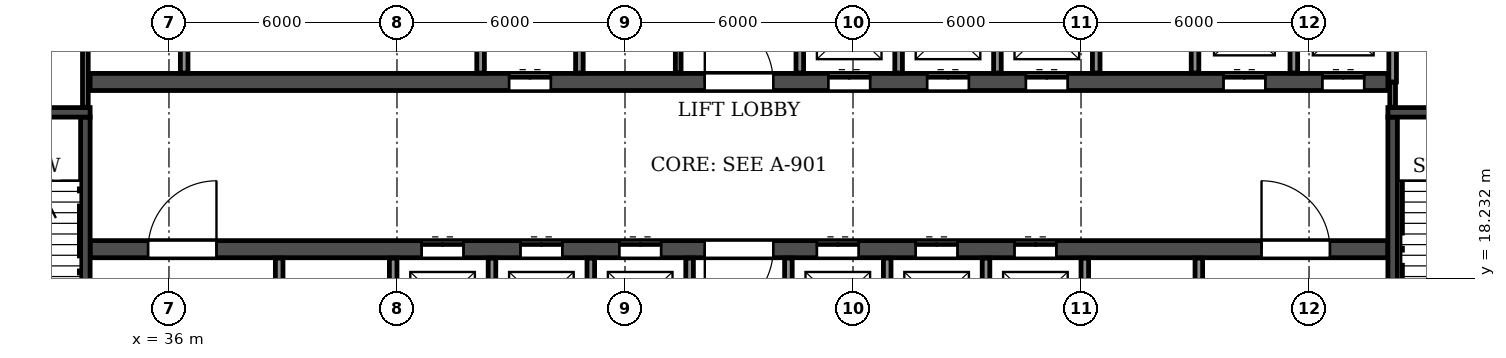
"""IFC4 building model, lengths in metres.
Left out: names, types, materials, properties, quantities, classifications, styles, units other than length and angle.
Written with IfcOpenShell. Run it as: python <this file> out.ifc"""

import sys

from ifc_helpers import new_model, si_unit, direction, frame, frame_2d, origin, place, context, subcontext, project, spatial, rectangle, extrude, element, fill, save


model = new_model("IFC4")
c1 = context("Model", 3, precision=1e-05, world=origin(), true_north=direction((0.0, 1.0)))
c2 = subcontext(c1, "Body", "Model", "MODEL_VIEW")
j1 = project(units=[si_unit("LENGTHUNIT", "METRE"), si_unit("PLANEANGLEUNIT", "RADIAN")], contexts=[c1])
p1 = place(None, origin())
s1 = spatial("IfcSite", under=j1, at=p1, CompositionType="ELEMENT")
p2 = place(p1, origin())
s2 = spatial("IfcBuilding", under=s1, at=p2, CompositionType="ELEMENT")
p3 = place(p2, origin())
s3 = spatial("IfcBuildingStorey", under=s2, at=p3, CompositionType="ELEMENT", Elevation=0.0)
p4 = place(p3, frame((33.925, 19.0, 0.0), z_axis=(0.0, 0.0, 1.0), x_axis=(1.0, 0.0, 0.0)))
e1 = element("IfcWall", 1, at=p4, inside=s3, PredefinedType="SOLIDWALL", context=c2, shape_type="SweptSolid", body=[
    extrude(rectangle(XDim=34.15, YDim=0.45, at=frame_2d((17.075, 0.0))), origin(), (0.0, 0.0, 1.0), 4.2),
])
p5 = place(p4, frame((16.175, 0.0, 0.0)))
e2 = element("IfcOpeningElement", 2, at=p5, cuts=e1, PredefinedType="OPENING", context=c2, shape_type="SweptSolid", body=[
    extrude(rectangle(XDim=1.8, YDim=2.1, at=frame_2d((0.9, 1.05))), frame((0.0, 0.235, 0.0), z_axis=(0.0, -1.0, 0.0), x_axis=(1.0, 0.0, 0.0)), (0.0, 0.0, 1.0), 0.47),
])
p6 = place(p4, frame((1.525, 0.0, 0.0)))
e3 = element("IfcOpeningElement", 3, at=p6, cuts=e1, PredefinedType="OPENING", context=c2, shape_type="SweptSolid", body=[
    extrude(rectangle(XDim=1.8, YDim=2.1, at=frame_2d((0.9, 1.05))), frame((0.0, 0.235, 0.0), z_axis=(0.0, -1.0, 0.0), x_axis=(1.0, 0.0, 0.0)), (0.0, 0.0, 1.0), 0.47),
])
p7 = place(p4, frame((8.725, 0.0, 0.0)))
e4 = element("IfcOpeningElement", 4, at=p7, cuts=e1, PredefinedType="OPENING", context=c2, shape_type="SweptSolid", body=[
    extrude(rectangle(XDim=1.1, YDim=2.1, at=frame_2d((0.55, 1.05))), frame((0.0, 0.235, 0.0), z_axis=(0.0, -1.0, 0.0), x_axis=(1.0, 0.0, 0.0)), (0.0, 0.0, 1.0), 0.47),
])
p8 = place(p4, frame((11.325, 0.0, 0.0)))
e5 = element("IfcOpeningElement", 5, at=p8, cuts=e1, PredefinedType="OPENING", context=c2, shape_type="SweptSolid", body=[
    extrude(rectangle(XDim=1.1, YDim=2.1, at=frame_2d((0.55, 1.05))), frame((0.0, 0.235, 0.0), z_axis=(0.0, -1.0, 0.0), x_axis=(1.0, 0.0, 0.0)), (0.0, 0.0, 1.0), 0.47),
])
p9 = place(p4, frame((13.925, 0.0, 0.0)))
e6 = element("IfcOpeningElement", 6, at=p9, cuts=e1, PredefinedType="OPENING", context=c2, shape_type="SweptSolid", body=[
    extrude(rectangle(XDim=1.1, YDim=2.1, at=frame_2d((0.55, 1.05))), frame((0.0, 0.235, 0.0), z_axis=(0.0, -1.0, 0.0), x_axis=(1.0, 0.0, 0.0)), (0.0, 0.0, 1.0), 0.47),
])
p10 = place(p4, frame((19.125, 0.0, 0.0)))
e7 = element("IfcOpeningElement", 7, at=p10, cuts=e1, PredefinedType="OPENING", context=c2, shape_type="SweptSolid", body=[
    extrude(rectangle(XDim=1.1, YDim=2.1, at=frame_2d((0.55, 1.05))), frame((0.0, 0.235, 0.0), z_axis=(0.0, -1.0, 0.0), x_axis=(1.0, 0.0, 0.0)), (0.0, 0.0, 1.0), 0.47),
])
p11 = place(p4, frame((21.725, 0.0, 0.0)))
e8 = element("IfcOpeningElement", 8, at=p11, cuts=e1, PredefinedType="OPENING", context=c2, shape_type="SweptSolid", body=[
    extrude(rectangle(XDim=1.1, YDim=2.1, at=frame_2d((0.55, 1.05))), frame((0.0, 0.235, 0.0), z_axis=(0.0, -1.0, 0.0), x_axis=(1.0, 0.0, 0.0)), (0.0, 0.0, 1.0), 0.47),
])
p12 = place(p4, frame((24.325, 0.0, 0.0)))
e9 = element("IfcOpeningElement", 9, at=p12, cuts=e1, PredefinedType="OPENING", context=c2, shape_type="SweptSolid", body=[
    extrude(rectangle(XDim=1.1, YDim=2.1, at=frame_2d((0.55, 1.05))), frame((0.0, 0.235, 0.0), z_axis=(0.0, -1.0, 0.0), x_axis=(1.0, 0.0, 0.0)), (0.0, 0.0, 1.0), 0.47),
])
p13 = place(p4, frame((30.825, 0.0, 0.0)))
e10 = element("IfcOpeningElement", 10, at=p13, cuts=e1, PredefinedType="OPENING", context=c2, shape_type="SweptSolid", body=[
    extrude(rectangle(XDim=1.8, YDim=2.1, at=frame_2d((0.9, 1.05))), frame((0.0, 0.235, 0.0), z_axis=(0.0, -1.0, 0.0), x_axis=(1.0, 0.0, 0.0)), (0.0, 0.0, 1.0), 0.47),
])
p14 = place(p3, frame((33.925, 23.4, 0.0), z_axis=(0.0, 0.0, 1.0), x_axis=(1.0, 0.0, 0.0)))
e11 = element("IfcWall", 11, at=p14, inside=s3, PredefinedType="SOLIDWALL", context=c2, shape_type="SweptSolid", body=[
    extrude(rectangle(XDim=34.15, YDim=0.45, at=frame_2d((17.075, 0.0))), origin(), (0.0, 0.0, 1.0), 4.2),
])
p15 = place(p14, frame((16.175, 0.0, 0.0)))
e12 = element("IfcOpeningElement", 12, at=p15, cuts=e11, PredefinedType="OPENING", context=c2, shape_type="SweptSolid", body=[
    extrude(rectangle(XDim=1.8, YDim=2.1, at=frame_2d((0.9, 1.05))), frame((0.0, 0.235, 0.0), z_axis=(0.0, -1.0, 0.0), x_axis=(1.0, 0.0, 0.0)), (0.0, 0.0, 1.0), 0.47),
])
p16 = place(p14, frame((11.025, 0.0, 0.0)))
e13 = element("IfcOpeningElement", 13, at=p16, cuts=e11, PredefinedType="OPENING", context=c2, shape_type="SweptSolid", body=[
    extrude(rectangle(XDim=1.1, YDim=2.1, at=frame_2d((0.55, 1.05))), frame((0.0, 0.235, 0.0), z_axis=(0.0, -1.0, 0.0), x_axis=(1.0, 0.0, 0.0)), (0.0, 0.0, 1.0), 0.47),
])
p17 = place(p14, frame((19.425, 0.0, 0.0)))
e14 = element("IfcOpeningElement", 14, at=p17, cuts=e11, PredefinedType="OPENING", context=c2, shape_type="SweptSolid", body=[
    extrude(rectangle(XDim=1.1, YDim=2.1, at=frame_2d((0.55, 1.05))), frame((0.0, 0.235, 0.0), z_axis=(0.0, -1.0, 0.0), x_axis=(1.0, 0.0, 0.0)), (0.0, 0.0, 1.0), 0.47),
])
p18 = place(p14, frame((22.025, 0.0, 0.0)))
e15 = element("IfcOpeningElement", 15, at=p18, cuts=e11, PredefinedType="OPENING", context=c2, shape_type="SweptSolid", body=[
    extrude(rectangle(XDim=1.1, YDim=2.1, at=frame_2d((0.55, 1.05))), frame((0.0, 0.235, 0.0), z_axis=(0.0, -1.0, 0.0), x_axis=(1.0, 0.0, 0.0)), (0.0, 0.0, 1.0), 0.47),
])
p19 = place(p14, frame((24.625, 0.0, 0.0)))
e16 = element("IfcOpeningElement", 16, at=p19, cuts=e11, PredefinedType="OPENING", context=c2, shape_type="SweptSolid", body=[
    extrude(rectangle(XDim=1.1, YDim=2.1, at=frame_2d((0.55, 1.05))), frame((0.0, 0.235, 0.0), z_axis=(0.0, -1.0, 0.0), x_axis=(1.0, 0.0, 0.0)), (0.0, 0.0, 1.0), 0.47),
])
p20 = place(p14, frame((29.825, 0.0, 0.0)))
e17 = element("IfcOpeningElement", 17, at=p20, cuts=e11, PredefinedType="OPENING", context=c2, shape_type="SweptSolid", body=[
    extrude(rectangle(XDim=1.1, YDim=2.1, at=frame_2d((0.55, 1.05))), frame((0.0, 0.235, 0.0), z_axis=(0.0, -1.0, 0.0), x_axis=(1.0, 0.0, 0.0)), (0.0, 0.0, 1.0), 0.47),
])
p21 = place(p14, frame((32.425, 0.0, 0.0)))
e18 = element("IfcOpeningElement", 18, at=p21, cuts=e11, PredefinedType="OPENING", context=c2, shape_type="SweptSolid", body=[
    extrude(rectangle(XDim=1.1, YDim=2.1, at=frame_2d((0.55, 1.05))), frame((0.0, 0.235, 0.0), z_axis=(0.0, -1.0, 0.0), x_axis=(1.0, 0.0, 0.0)), (0.0, 0.0, 1.0), 0.47),
])
p22 = place(p3, frame((33.8, 14.6, 0.0), z_axis=(0.0, 0.0, 1.0), x_axis=(0.0, 1.0, 0.0)))
e19 = element("IfcWall", 19, at=p22, inside=s3, PredefinedType="SOLIDWALL", context=c2, shape_type="SweptSolid", body=[
    extrude(rectangle(XDim=7.875, YDim=0.25, at=frame_2d((3.938, 0.0))), origin(), (0.0, 0.0, 1.0), 4.2),
])
p23 = place(p22, frame((0.7, 0.0, 0.0)))
e20 = element("IfcOpeningElement", 20, at=p23, cuts=e19, PredefinedType="OPENING", context=c2, shape_type="SweptSolid", body=[
    extrude(rectangle(XDim=1.0, YDim=2.1, at=frame_2d((0.5, 1.05))), frame((0.0, 0.135, 0.0), z_axis=(0.0, -1.0, 0.0), x_axis=(1.0, 0.0, 0.0)), (0.0, 0.0, 1.0), 0.27),
])
p24 = place(p3, frame((29.875, 22.6, 0.0), z_axis=(0.0, 0.0, 1.0), x_axis=(1.0, 0.0, 0.0)))
e21 = element("IfcWall", 21, at=p24, inside=s3, PredefinedType="SOLIDWALL", context=c2, shape_type="SweptSolid", body=[
    extrude(rectangle(XDim=4.05, YDim=0.25, at=frame_2d((2.025, 0.0))), origin(), (0.0, 0.0, 1.0), 4.2),
])
p25 = place(p3, frame((68.2, 14.6, 0.0), z_axis=(0.0, 0.0, 1.0), x_axis=(0.0, 1.0, 0.0)))
e22 = element("IfcWall", 22, at=p25, inside=s3, PredefinedType="SOLIDWALL", context=c2, shape_type="SweptSolid", body=[
    extrude(rectangle(XDim=7.875, YDim=0.25, at=frame_2d((3.938, 0.0))), origin(), (0.0, 0.0, 1.0), 4.2),
])
p26 = place(p25, frame((0.7, 0.0, 0.0)))
e23 = element("IfcOpeningElement", 23, at=p26, cuts=e22, PredefinedType="OPENING", context=c2, shape_type="SweptSolid", body=[
    extrude(rectangle(XDim=1.0, YDim=2.1, at=frame_2d((0.5, 1.05))), frame((0.0, 0.135, 0.0), z_axis=(0.0, -1.0, 0.0), x_axis=(1.0, 0.0, 0.0)), (0.0, 0.0, 1.0), 0.27),
])
p27 = place(p3, frame((68.075, 22.6, 0.0), z_axis=(0.0, 0.0, 1.0), x_axis=(1.0, 0.0, 0.0)))
e24 = element("IfcWall", 24, at=p27, inside=s3, PredefinedType="SOLIDWALL", context=c2, shape_type="SweptSolid", body=[
    extrude(rectangle(XDim=4.05, YDim=0.25, at=frame_2d((2.025, 0.0))), origin(), (0.0, 0.0, 1.0), 4.2),
])
p28 = place(p3, frame((49.4, 23.635, 0.0), z_axis=(0.0, 0.0, 1.0), x_axis=(0.0, 1.0, 0.0)))
e25 = element("IfcWall", 25, at=p28, inside=s3, PredefinedType="PARTITIONING", context=c2, shape_type="SweptSolid", body=[
    extrude(rectangle(XDim=4.09, YDim=0.15, at=frame_2d((2.045, 0.0))), origin(), (0.0, 0.0, 1.0), 4.2),
])
p29 = place(p3, frame((36.4, 23.635, 0.0), z_axis=(0.0, 0.0, 1.0), x_axis=(0.0, 1.0, 0.0)))
e26 = element("IfcWall", 26, at=p29, inside=s3, PredefinedType="PARTITIONING", context=c2, shape_type="SweptSolid", body=[
    extrude(rectangle(XDim=4.09, YDim=0.2, at=frame_2d((2.045, 0.0))), origin(), (0.0, 0.0, 1.0), 4.2),
])
p30 = place(p3, frame((33.8, 22.735, 0.0), z_axis=(0.0, 0.0, 1.0), x_axis=(0.0, 1.0, 0.0)))
e27 = element("IfcWall", 27, at=p30, inside=s3, PredefinedType="PARTITIONING", context=c2, shape_type="SweptSolid", body=[
    extrude(rectangle(XDim=4.99, YDim=0.15, at=frame_2d((2.495, 0.0))), origin(), (0.0, 0.0, 1.0), 4.2),
])
p31 = place(p3, frame((68.2, 22.735, 0.0), z_axis=(0.0, 0.0, 1.0), x_axis=(0.0, 1.0, 0.0)))
e28 = element("IfcWall", 28, at=p31, inside=s3, PredefinedType="PARTITIONING", context=c2, shape_type="SweptSolid", body=[
    extrude(rectangle(XDim=0.665, YDim=0.15, at=frame_2d((0.333, 0.0))), origin(), (0.0, 0.0, 1.0), 4.2),
])
p32 = place(p3, frame((38.9, 14.7, 0.0), z_axis=(0.0, 0.0, 1.0), x_axis=(0.0, 1.0, 0.0)))
e29 = element("IfcWall", 29, at=p32, inside=s3, PredefinedType="PARTITIONING", context=c2, shape_type="SweptSolid", body=[
    extrude(rectangle(XDim=4.065, YDim=0.2, at=frame_2d((2.032, 0.0))), origin(), (0.0, 0.0, 1.0), 4.2),
])
p33 = place(p32, frame((1.55, 0.0, 0.0)))
e30 = element("IfcOpeningElement", 30, at=p33, cuts=e29, PredefinedType="OPENING", context=c2, shape_type="SweptSolid", body=[
    extrude(rectangle(XDim=1.1, YDim=2.1, at=frame_2d((0.55, 1.05))), frame((0.0, 0.11, 0.0), z_axis=(0.0, -1.0, 0.0), x_axis=(1.0, 0.0, 0.0)), (0.0, 0.0, 1.0), 0.22),
])
for number, where, z_axis, x_axis in (
    (31, (41.9, 14.7, 0.0), (0.0, 0.0, 1.0), (0.0, 1.0, 0.0)),
    (32, (44.2, 23.635, 0.0), (0.0, 0.0, 1.0), (0.0, 1.0, 0.0)),
):
    element("IfcWall", number, at=place(p3, frame(where, z_axis=z_axis, x_axis=x_axis)), inside=s3, PredefinedType="PARTITIONING", context=c2, shape_type="SweptSolid", body=[
        extrude(rectangle(XDim=4.065, YDim=0.2, at=frame_2d((2.032, 0.0))), origin(), (0.0, 0.0, 1.0), 4.2),
    ])
p34 = place(p3, frame((44.5, 16.3, 0.0), z_axis=(0.0, 0.0, 1.0), x_axis=(0.0, 1.0, 0.0)))
e33 = element("IfcWall", 33, at=p34, inside=s3, PredefinedType="PARTITIONING", context=c2, shape_type="SweptSolid", body=[
    extrude(rectangle(XDim=2.465, YDim=0.2, at=frame_2d((1.232, 0.0))), origin(), (0.0, 0.0, 1.0), 4.2),
])
p35 = place(p3, frame((46.8, 23.635, 0.0), z_axis=(0.0, 0.0, 1.0), x_axis=(0.0, 1.0, 0.0)))
e34 = element("IfcWall", 34, at=p35, inside=s3, PredefinedType="PARTITIONING", context=c2, shape_type="SweptSolid", body=[
    extrude(rectangle(XDim=4.065, YDim=0.2, at=frame_2d((2.032, 0.0))), origin(), (0.0, 0.0, 1.0), 4.2),
])
for number, where, z_axis, x_axis in (
    (35, (47.1, 16.3, 0.0), (0.0, 0.0, 1.0), (0.0, 1.0, 0.0)),
    (36, (49.7, 16.3, 0.0), (0.0, 0.0, 1.0), (0.0, 1.0, 0.0)),
    (37, (52.3, 16.3, 0.0), (0.0, 0.0, 1.0), (0.0, 1.0, 0.0)),
):
    element("IfcWall", number, at=place(p3, frame(where, z_axis=z_axis, x_axis=x_axis)), inside=s3, PredefinedType="PARTITIONING", context=c2, shape_type="SweptSolid", body=[
        extrude(rectangle(XDim=2.465, YDim=0.2, at=frame_2d((1.232, 0.0))), origin(), (0.0, 0.0, 1.0), 4.2),
    ])
p36 = place(p3, frame((52.6, 23.635, 0.0), z_axis=(0.0, 0.0, 1.0), x_axis=(0.0, 1.0, 0.0)))
e38 = element("IfcWall", 38, at=p36, inside=s3, PredefinedType="PARTITIONING", context=c2, shape_type="SweptSolid", body=[
    extrude(rectangle(XDim=2.465, YDim=0.2, at=frame_2d((1.232, 0.0))), origin(), (0.0, 0.0, 1.0), 4.2),
])
p37 = place(p3, frame((54.9, 16.3, 0.0), z_axis=(0.0, 0.0, 1.0), x_axis=(0.0, 1.0, 0.0)))
e39 = element("IfcWall", 39, at=p37, inside=s3, PredefinedType="PARTITIONING", context=c2, shape_type="SweptSolid", body=[
    extrude(rectangle(XDim=2.465, YDim=0.2, at=frame_2d((1.232, 0.0))), origin(), (0.0, 0.0, 1.0), 4.2),
])
p38 = place(p3, frame((55.2, 23.635, 0.0), z_axis=(0.0, 0.0, 1.0), x_axis=(0.0, 1.0, 0.0)))
e40 = element("IfcWall", 40, at=p38, inside=s3, PredefinedType="PARTITIONING", context=c2, shape_type="SweptSolid", body=[
    extrude(rectangle(XDim=2.465, YDim=0.2, at=frame_2d((1.232, 0.0))), origin(), (0.0, 0.0, 1.0), 4.2),
])
p39 = place(p3, frame((57.5, 16.3, 0.0), z_axis=(0.0, 0.0, 1.0), x_axis=(0.0, 1.0, 0.0)))
e41 = element("IfcWall", 41, at=p39, inside=s3, PredefinedType="PARTITIONING", context=c2, shape_type="SweptSolid", body=[
    extrude(rectangle(XDim=2.465, YDim=0.2, at=frame_2d((1.232, 0.0))), origin(), (0.0, 0.0, 1.0), 4.2),
])
p40 = place(p3, frame((57.8, 23.635, 0.0), z_axis=(0.0, 0.0, 1.0), x_axis=(0.0, 1.0, 0.0)))
e42 = element("IfcWall", 42, at=p40, inside=s3, PredefinedType="PARTITIONING", context=c2, shape_type="SweptSolid", body=[
    extrude(rectangle(XDim=2.465, YDim=0.2, at=frame_2d((1.232, 0.0))), origin(), (0.0, 0.0, 1.0), 4.2),
])
p41 = place(p3, frame((60.1, 14.7, 0.0), z_axis=(0.0, 0.0, 1.0), x_axis=(0.0, 1.0, 0.0)))
e43 = element("IfcWall", 43, at=p41, inside=s3, PredefinedType="PARTITIONING", context=c2, shape_type="SweptSolid", body=[
    extrude(rectangle(XDim=4.065, YDim=0.2, at=frame_2d((2.032, 0.0))), origin(), (0.0, 0.0, 1.0), 4.2),
])
for number, where, z_axis, x_axis in (
    (44, (60.4, 23.635, 0.0), (0.0, 0.0, 1.0), (0.0, 1.0, 0.0)),
    (45, (63.0, 23.635, 0.0), (0.0, 0.0, 1.0), (0.0, 1.0, 0.0)),
):
    element("IfcWall", number, at=place(p3, frame(where, z_axis=z_axis, x_axis=x_axis)), inside=s3, PredefinedType="PARTITIONING", context=c2, shape_type="SweptSolid", body=[
        extrude(rectangle(XDim=2.465, YDim=0.2, at=frame_2d((1.232, 0.0))), origin(), (0.0, 0.0, 1.0), 4.2),
    ])
p42 = place(p3, frame((63.1, 14.7, 0.0), z_axis=(0.0, 0.0, 1.0), x_axis=(0.0, 1.0, 0.0)))
e46 = element("IfcWall", 46, at=p42, inside=s3, PredefinedType="PARTITIONING", context=c2, shape_type="SweptSolid", body=[
    extrude(rectangle(XDim=4.065, YDim=0.2, at=frame_2d((2.032, 0.0))), origin(), (0.0, 0.0, 1.0), 4.2),
])
p43 = place(p42, frame((1.55, 0.0, 0.0)))
e47 = element("IfcOpeningElement", 47, at=p43, cuts=e46, PredefinedType="OPENING", context=c2, shape_type="SweptSolid", body=[
    extrude(rectangle(XDim=1.1, YDim=2.1, at=frame_2d((0.55, 1.05))), frame((0.0, 0.11, 0.0), z_axis=(0.0, -1.0, 0.0), x_axis=(1.0, 0.0, 0.0)), (0.0, 0.0, 1.0), 0.22),
])
p44 = place(p3, frame((65.6, 23.635, 0.0), z_axis=(0.0, 0.0, 1.0), x_axis=(0.0, 1.0, 0.0)))
e48 = element("IfcWall", 48, at=p44, inside=s3, PredefinedType="PARTITIONING", context=c2, shape_type="SweptSolid", body=[
    extrude(rectangle(XDim=2.465, YDim=0.2, at=frame_2d((1.232, 0.0))), origin(), (0.0, 0.0, 1.0), 4.2),
])
p45 = place(p3, frame((68.2, 23.4, 0.0), z_axis=(0.0, 0.0, 1.0), x_axis=(0.0, 1.0, 0.0)))
e49 = element("IfcWall", 49, at=p45, inside=s3, PredefinedType="PARTITIONING", context=c2, shape_type="SweptSolid", body=[
    extrude(rectangle(XDim=2.7, YDim=0.2, at=frame_2d((1.35, 0.0))), origin(), (0.0, 0.0, 1.0), 4.2),
])
p46 = place(p15, origin())
e50 = element("IfcDoor", 50, at=p46, inside=s3, OperationType="DOUBLE_DOOR_SINGLE_SWING", PredefinedType="DOOR", context=c2, shape_type="SweptSolid", body=[
    extrude(rectangle(XDim=1.8, YDim=2.1, at=frame_2d((0.9, 1.05))), frame((0.0, 0.025, 0.0), z_axis=(0.0, -1.0, 0.0), x_axis=(1.0, 0.0, 0.0)), (0.0, 0.0, 1.0), 0.05),
])
fill(e12, e50)
p47 = place(p5, frame((1.8, 0.0, 0.0), z_axis=(0.0, 0.0, 1.0), x_axis=(-1.0, 0.0, 0.0)))
e51 = element("IfcDoor", 51, at=p47, inside=s3, OperationType="DOUBLE_DOOR_SINGLE_SWING", PredefinedType="DOOR", context=c2, shape_type="SweptSolid", body=[
    extrude(rectangle(XDim=1.8, YDim=2.1, at=frame_2d((0.9, 1.05))), frame((0.0, 0.025, 0.0), z_axis=(0.0, -1.0, 0.0), x_axis=(1.0, 0.0, 0.0)), (0.0, 0.0, 1.0), 0.05),
])
fill(e2, e51)
p48 = place(p6, origin())
e52 = element("IfcDoor", 52, at=p48, inside=s3, OperationType="DOUBLE_DOOR_SINGLE_SWING", PredefinedType="DOOR", context=c2, shape_type="SweptSolid", body=[
    extrude(rectangle(XDim=1.8, YDim=2.1, at=frame_2d((0.9, 1.05))), frame((0.0, 0.025, 0.0), z_axis=(0.0, -1.0, 0.0), x_axis=(1.0, 0.0, 0.0)), (0.0, 0.0, 1.0), 0.05),
])
fill(e3, e52)
p49 = place(p7, origin())
e53 = element("IfcDoor", 53, at=p49, inside=s3, OperationType="DOUBLE_DOOR_SLIDING", PredefinedType="DOOR", context=c2, shape_type="SweptSolid", body=[
    extrude(rectangle(XDim=1.1, YDim=2.1, at=frame_2d((0.55, 1.05))), frame((0.0, 0.025, 0.0), z_axis=(0.0, -1.0, 0.0), x_axis=(1.0, 0.0, 0.0)), (0.0, 0.0, 1.0), 0.05),
])
fill(e4, e53)
p50 = place(p16, origin())
e54 = element("IfcDoor", 54, at=p50, inside=s3, OperationType="DOUBLE_DOOR_SLIDING", PredefinedType="DOOR", context=c2, shape_type="SweptSolid", body=[
    extrude(rectangle(XDim=1.1, YDim=2.1, at=frame_2d((0.55, 1.05))), frame((0.0, 0.025, 0.0), z_axis=(0.0, -1.0, 0.0), x_axis=(1.0, 0.0, 0.0)), (0.0, 0.0, 1.0), 0.05),
])
fill(e13, e54)
p51 = place(p8, origin())
e55 = element("IfcDoor", 55, at=p51, inside=s3, OperationType="DOUBLE_DOOR_SLIDING", PredefinedType="DOOR", context=c2, shape_type="SweptSolid", body=[
    extrude(rectangle(XDim=1.1, YDim=2.1, at=frame_2d((0.55, 1.05))), frame((0.0, 0.025, 0.0), z_axis=(0.0, -1.0, 0.0), x_axis=(1.0, 0.0, 0.0)), (0.0, 0.0, 1.0), 0.05),
])
fill(e5, e55)
p52 = place(p9, origin())
e56 = element("IfcDoor", 56, at=p52, inside=s3, OperationType="DOUBLE_DOOR_SLIDING", PredefinedType="DOOR", context=c2, shape_type="SweptSolid", body=[
    extrude(rectangle(XDim=1.1, YDim=2.1, at=frame_2d((0.55, 1.05))), frame((0.0, 0.025, 0.0), z_axis=(0.0, -1.0, 0.0), x_axis=(1.0, 0.0, 0.0)), (0.0, 0.0, 1.0), 0.05),
])
fill(e6, e56)
p53 = place(p10, origin())
e57 = element("IfcDoor", 57, at=p53, inside=s3, OperationType="DOUBLE_DOOR_SLIDING", PredefinedType="DOOR", context=c2, shape_type="SweptSolid", body=[
    extrude(rectangle(XDim=1.1, YDim=2.1, at=frame_2d((0.55, 1.05))), frame((0.0, 0.025, 0.0), z_axis=(0.0, -1.0, 0.0), x_axis=(1.0, 0.0, 0.0)), (0.0, 0.0, 1.0), 0.05),
])
fill(e7, e57)
p54 = place(p17, origin())
e58 = element("IfcDoor", 58, at=p54, inside=s3, OperationType="DOUBLE_DOOR_SLIDING", PredefinedType="DOOR", context=c2, shape_type="SweptSolid", body=[
    extrude(rectangle(XDim=1.1, YDim=2.1, at=frame_2d((0.55, 1.05))), frame((0.0, 0.025, 0.0), z_axis=(0.0, -1.0, 0.0), x_axis=(1.0, 0.0, 0.0)), (0.0, 0.0, 1.0), 0.05),
])
fill(e14, e58)
p55 = place(p11, origin())
e59 = element("IfcDoor", 59, at=p55, inside=s3, OperationType="DOUBLE_DOOR_SLIDING", PredefinedType="DOOR", context=c2, shape_type="SweptSolid", body=[
    extrude(rectangle(XDim=1.1, YDim=2.1, at=frame_2d((0.55, 1.05))), frame((0.0, 0.025, 0.0), z_axis=(0.0, -1.0, 0.0), x_axis=(1.0, 0.0, 0.0)), (0.0, 0.0, 1.0), 0.05),
])
fill(e8, e59)
p56 = place(p18, origin())
e60 = element("IfcDoor", 60, at=p56, inside=s3, OperationType="DOUBLE_DOOR_SLIDING", PredefinedType="DOOR", context=c2, shape_type="SweptSolid", body=[
    extrude(rectangle(XDim=1.1, YDim=2.1, at=frame_2d((0.55, 1.05))), frame((0.0, 0.025, 0.0), z_axis=(0.0, -1.0, 0.0), x_axis=(1.0, 0.0, 0.0)), (0.0, 0.0, 1.0), 0.05),
])
fill(e15, e60)
p57 = place(p12, origin())
e61 = element("IfcDoor", 61, at=p57, inside=s3, OperationType="DOUBLE_DOOR_SLIDING", PredefinedType="DOOR", context=c2, shape_type="SweptSolid", body=[
    extrude(rectangle(XDim=1.1, YDim=2.1, at=frame_2d((0.55, 1.05))), frame((0.0, 0.025, 0.0), z_axis=(0.0, -1.0, 0.0), x_axis=(1.0, 0.0, 0.0)), (0.0, 0.0, 1.0), 0.05),
])
fill(e9, e61)
p58 = place(p19, origin())
e62 = element("IfcDoor", 62, at=p58, inside=s3, OperationType="DOUBLE_DOOR_SLIDING", PredefinedType="DOOR", context=c2, shape_type="SweptSolid", body=[
    extrude(rectangle(XDim=1.1, YDim=2.1, at=frame_2d((0.55, 1.05))), frame((0.0, 0.025, 0.0), z_axis=(0.0, -1.0, 0.0), x_axis=(1.0, 0.0, 0.0)), (0.0, 0.0, 1.0), 0.05),
])
fill(e16, e62)
p59 = place(p20, origin())
e63 = element("IfcDoor", 63, at=p59, inside=s3, OperationType="DOUBLE_DOOR_SLIDING", PredefinedType="DOOR", context=c2, shape_type="SweptSolid", body=[
    extrude(rectangle(XDim=1.1, YDim=2.1, at=frame_2d((0.55, 1.05))), frame((0.0, 0.025, 0.0), z_axis=(0.0, -1.0, 0.0), x_axis=(1.0, 0.0, 0.0)), (0.0, 0.0, 1.0), 0.05),
])
fill(e17, e63)
p60 = place(p13, origin())
e64 = element("IfcDoor", 64, at=p60, inside=s3, OperationType="DOUBLE_DOOR_SINGLE_SWING", PredefinedType="DOOR", context=c2, shape_type="SweptSolid", body=[
    extrude(rectangle(XDim=1.8, YDim=2.1, at=frame_2d((0.9, 1.05))), frame((0.0, 0.025, 0.0), z_axis=(0.0, -1.0, 0.0), x_axis=(1.0, 0.0, 0.0)), (0.0, 0.0, 1.0), 0.05),
])
fill(e10, e64)
p61 = place(p21, origin())
e65 = element("IfcDoor", 65, at=p61, inside=s3, OperationType="DOUBLE_DOOR_SLIDING", PredefinedType="DOOR", context=c2, shape_type="SweptSolid", body=[
    extrude(rectangle(XDim=1.1, YDim=2.1, at=frame_2d((0.55, 1.05))), frame((0.0, 0.025, 0.0), z_axis=(0.0, -1.0, 0.0), x_axis=(1.0, 0.0, 0.0)), (0.0, 0.0, 1.0), 0.05),
])
fill(e18, e65)
save(model, sys.argv[1])
